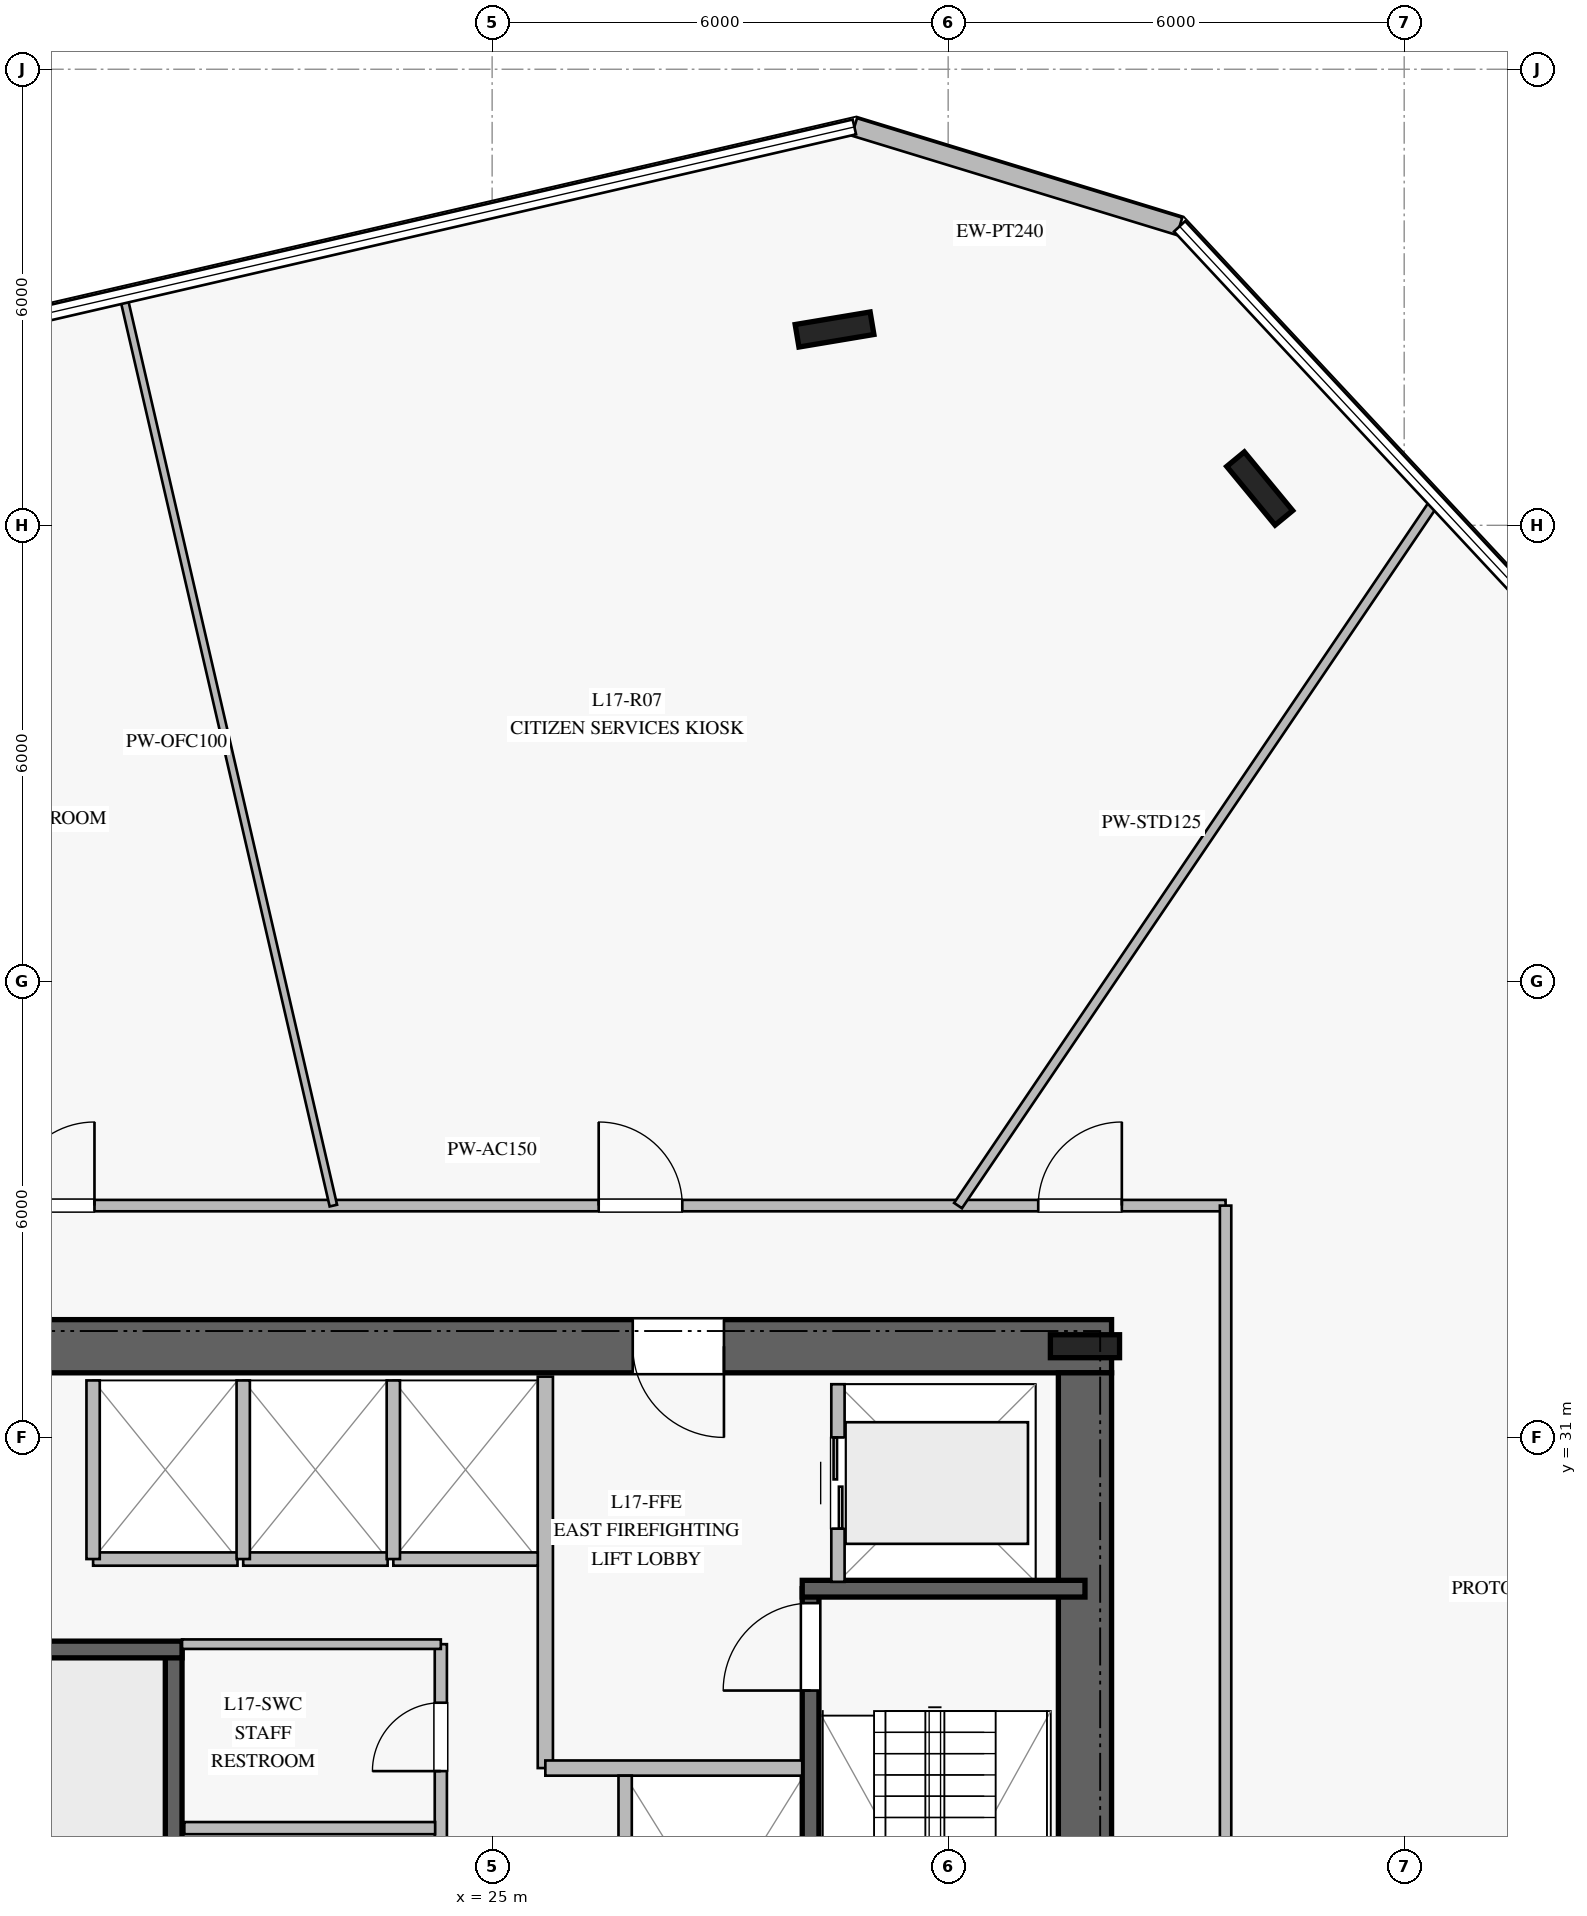
"""IFC4 building model, lengths in metres.
Left out: names, types, materials, properties, quantities, classifications, styles, units other than length and angle.
Written with IfcOpenShell. Run it as: python <this file> out.ifc"""

import sys

from ifc_helpers import new_model, si_unit, direction, frame, frame_2d, origin, origin_2d, place, context, subcontext, project, spatial, rectangle, i_section, extrude, element, fill, save


model = new_model("IFC4")
c1 = context("Model", 3, precision=1e-05, world=origin(), true_north=direction((0.0, 1.0)))
c2 = subcontext(c1, "Body", "Model", "MODEL_VIEW")
j1 = project(units=[si_unit("LENGTHUNIT", "METRE"), si_unit("PLANEANGLEUNIT", "RADIAN")], contexts=[c1])
p1 = place(None, origin())
s1 = spatial("IfcSite", under=j1, at=p1, CompositionType="ELEMENT")
p2 = place(p1, origin())
s2 = spatial("IfcBuilding", under=s1, at=p2, CompositionType="ELEMENT")
p3 = place(p2, frame((0.0, 0.0, 72.0)))
s3 = spatial("IfcBuildingStorey", under=s2, at=p3, CompositionType="ELEMENT", Elevation=72.0)
p4 = place(p3, frame((33.15, 32.2, 0.0), z_axis=(0.0, 0.0, 1.0), x_axis=(-1.0, 0.0, 0.0)))
e1 = element("IfcWall", 1, at=p4, inside=s3, PredefinedType="SHEAR", context=c2, shape_type="SweptSolid", body=[
    extrude(rectangle(XDim=16.3, YDim=0.7, at=frame_2d((8.15, 0.0))), origin(), (0.0, 0.0, 1.0), 3.76),
])
p5 = place(p4, frame((5.1, 0.0, 0.0)))
e2 = element("IfcOpeningElement", 2, at=p5, cuts=e1, PredefinedType="OPENING", context=c2, shape_type="SweptSolid", body=[
    extrude(rectangle(XDim=1.2, YDim=2.25, at=frame_2d((0.6, 1.125))), frame((0.0, 0.36, 0.0), z_axis=(0.0, -1.0, 0.0), x_axis=(1.0, 0.0, 0.0)), (0.0, 0.0, 1.0), 0.72),
])
p6 = place(p3, frame((32.8, 18.15, 0.0), z_axis=(0.0, 0.0, 1.0), x_axis=(0.0, 1.0, 0.0)))
e3 = element("IfcWall", 3, at=p6, inside=s3, PredefinedType="SHEAR", context=c2, shape_type="SweptSolid", body=[
    extrude(rectangle(XDim=13.7, YDim=0.7, at=frame_2d((6.85, 0.0))), origin(), (0.0, 0.0, 1.0), 3.76),
])
p7 = place(p3, frame((32.8, 32.2, 0.0), z_axis=(0.0, 0.0, 1.0), x_axis=(1.0, 0.0, 0.0)))
e4 = element("IfcColumn", 4, at=p7, inside=s3, PredefinedType="COLUMN", context=c2, shape_type="SweptSolid", body=[
    extrude(i_section(OverallWidth=0.302, OverallDepth=0.91, WebThickness=0.021, FlangeThickness=0.04, at=origin_2d()), origin(), (0.0, 0.0, 1.0), 4.0),
])
p8 = place(p3, frame((20.81, 20.99, 0.0), z_axis=(0.0, 0.0, 1.0), x_axis=(0.0, 1.0, 0.0)))
e5 = element("IfcWall", 5, at=p8, inside=s3, PredefinedType="SOLIDWALL", context=c2, shape_type="SweptSolid", body=[
    extrude(rectangle(XDim=7.22, YDim=0.22, at=frame_2d((3.61, 0.0))), origin(), (0.0, 0.0, 1.0), 3.76),
])
p9 = place(p8, frame((0.18, 0.0, 0.0)))
e6 = element("IfcOpeningElement", 6, at=p9, cuts=e5, PredefinedType="OPENING", context=c2, shape_type="SweptSolid", body=[
    extrude(rectangle(XDim=1.15, YDim=2.2, at=frame_2d((0.575, 1.1))), frame((0.0, 0.12, 0.0), z_axis=(0.0, -1.0, 0.0), x_axis=(1.0, 0.0, 0.0)), (0.0, 0.0, 1.0), 0.24),
])
p10 = place(p3, frame((17.2, 28.21, 0.0), z_axis=(0.0, 0.0, 1.0), x_axis=(1.0, 0.0, 0.0)))
e7 = element("IfcWall", 7, at=p10, inside=s3, PredefinedType="SOLIDWALL", context=c2, shape_type="SweptSolid", body=[
    extrude(rectangle(XDim=3.72, YDim=0.22, at=frame_2d((1.86, 0.0))), origin(), (0.0, 0.0, 1.0), 3.76),
])
p11 = place(p3, frame((29.19, 21.79, 0.0), z_axis=(0.0, 0.0, 1.0), x_axis=(0.0, 1.0, 0.0)))
e8 = element("IfcWall", 8, at=p11, inside=s3, PredefinedType="SOLIDWALL", context=c2, shape_type="SweptSolid", body=[
    extrude(rectangle(XDim=7.22, YDim=0.22, at=frame_2d((3.61, 0.0))), origin(), (0.0, 0.0, 1.0), 3.76),
])
p12 = place(p11, frame((5.88, 0.0, 0.0)))
e9 = element("IfcOpeningElement", 9, at=p12, cuts=e8, PredefinedType="OPENING", context=c2, shape_type="SweptSolid", body=[
    extrude(rectangle(XDim=1.15, YDim=2.2, at=frame_2d((0.575, 1.1))), frame((0.0, 0.12, 0.0), z_axis=(0.0, -1.0, 0.0), x_axis=(1.0, 0.0, 0.0)), (0.0, 0.0, 1.0), 0.24),
])
p13 = place(p3, frame((29.08, 29.01, 0.0), z_axis=(0.0, 0.0, 1.0), x_axis=(1.0, 0.0, 0.0)))
e10 = element("IfcWall", 10, at=p13, inside=s3, PredefinedType="SOLIDWALL", context=c2, shape_type="SweptSolid", body=[
    extrude(rectangle(XDim=3.72, YDim=0.22, at=frame_2d((1.86, 0.0))), origin(), (0.0, 0.0, 1.0), 3.76),
])
for number, where, z_axis, x_axis in (
    (11, (35.099, 43.484, 0.0), (0.0, 0.0, 1.0), (-0.636, 0.772, 0.0)),
    (12, (29.505, 45.576, 0.0), (0.0, 0.0, 1.0), (0.986, 0.165, 0.0)),
):
    element("IfcColumn", number, at=place(p3, frame(where, z_axis=z_axis, x_axis=x_axis)), inside=s3, PredefinedType="COLUMN", context=c2, shape_type="SweptSolid", body=[
        extrude(i_section(OverallWidth=0.3, OverallDepth=1.0, WebThickness=0.019, FlangeThickness=0.036, at=origin_2d()), origin(), (0.0, 0.0, 1.0), 4.0),
    ])
p14 = place(p3, frame((34.045, 46.933, 0.0), z_axis=(0.0, 0.0, 1.0), x_axis=(-0.956323609786, 0.292310029535, 0.0)))
e13 = element("IfcWall", 13, at=p14, inside=s3, PredefinedType="STANDARD", context=c2, shape_type="SweptSolid", body=[
    extrude(rectangle(XDim=4.474, YDim=0.24, at=frame_2d((2.237, 0.0))), origin(), (0.0, 0.0, 1.0), 3.76),
])
p15 = place(p3, frame((25.7, 26.65, 0.0), z_axis=(0.0, 0.0, 1.0), x_axis=(0.0, 1.0, 0.0)))
e14 = element("IfcWall", 14, at=p15, inside=s3, PredefinedType="PARTITIONING", context=c2, shape_type="SweptSolid", body=[
    extrude(rectangle(XDim=5.15, YDim=0.2, at=frame_2d((2.575, 0.0))), origin(), (0.0, 0.0, 1.0), 3.76),
])
p16 = place(p3, frame((25.7, 26.65, 0.0), z_axis=(0.0, 0.0, 1.0), x_axis=(1.0, 0.0, 0.0)))
e15 = element("IfcWall", 15, at=p16, inside=s3, PredefinedType="PARTITIONING", context=c2, shape_type="SweptSolid", body=[
    extrude(rectangle(XDim=3.38, YDim=0.2, at=frame_2d((1.69, 0.0))), origin(), (0.0, 0.0, 1.0), 3.76),
])
p17 = place(p3, frame((24.325, 23.35, 0.0), z_axis=(0.0, 0.0, 1.0), x_axis=(0.0, 1.0, 0.0)))
e16 = element("IfcWall", 16, at=p17, inside=s3, PredefinedType="PLUMBINGWALL", context=c2, shape_type="SweptSolid", body=[
    extrude(rectangle(XDim=4.93, YDim=0.16, at=frame_2d((2.465, 0.0))), origin(), (0.0, 0.0, 1.0), 3.76),
])
p18 = place(p17, frame((0.8, 0.0, 0.0)))
e17 = element("IfcOpeningElement", 17, at=p18, cuts=e16, PredefinedType="OPENING", context=c2, shape_type="SweptSolid", body=[
    extrude(rectangle(XDim=0.95, YDim=2.1, at=frame_2d((0.475, 1.05))), frame((0.0, 0.09, 0.0), z_axis=(0.0, -1.0, 0.0), x_axis=(1.0, 0.0, 0.0)), (0.0, 0.0, 1.0), 0.18),
])
p19 = place(p17, frame((3.26, 0.0, 0.0)))
e18 = element("IfcOpeningElement", 18, at=p19, cuts=e16, PredefinedType="OPENING", context=c2, shape_type="SweptSolid", body=[
    extrude(rectangle(XDim=0.9, YDim=2.1, at=frame_2d((0.45, 1.05))), frame((0.0, 0.09, 0.0), z_axis=(0.0, -1.0, 0.0), x_axis=(1.0, 0.0, 0.0)), (0.0, 0.0, 1.0), 0.18),
])
p20 = place(p3, frame((20.92, 28.28, 0.0), z_axis=(0.0, 0.0, 1.0), x_axis=(1.0, 0.0, 0.0)))
e19 = element("IfcWall", 19, at=p20, inside=s3, PredefinedType="PARTITIONING", context=c2, shape_type="SweptSolid", body=[
    extrude(rectangle(XDim=3.405, YDim=0.125, at=frame_2d((1.703, 0.0))), origin(), (0.0, 0.0, 1.0), 3.76),
])
p21 = place(p3, frame((20.95, 25.86, 0.0), z_axis=(0.0, 0.0, 1.0), x_axis=(1.0, 0.0, 0.0)))
e20 = element("IfcWall", 20, at=p21, inside=s3, PredefinedType="PLUMBINGWALL", context=c2, shape_type="SweptSolid", body=[
    extrude(rectangle(XDim=3.3, YDim=0.16, at=frame_2d((1.65, 0.0))), origin(), (0.0, 0.0, 1.0), 3.76),
])
p22 = place(p3, frame((19.75, 29.4, 0.0), z_axis=(0.0, 0.0, 1.0), x_axis=(1.0, 0.0, 0.0)))
e21 = element("IfcWall", 21, at=p22, inside=s3, PredefinedType="PARTITIONING", context=c2, shape_type="SweptSolid", body=[
    extrude(rectangle(XDim=1.9, YDim=0.175, at=frame_2d((0.95, 0.0))), origin(), (0.0, 0.0, 1.0), 3.76),
])
p23 = place(p3, frame((19.75, 29.4, 0.0), z_axis=(0.0, 0.0, 1.0), x_axis=(0.0, 1.0, 0.0)))
e22 = element("IfcWall", 22, at=p23, inside=s3, PredefinedType="PARTITIONING", context=c2, shape_type="SweptSolid", body=[
    extrude(rectangle(XDim=2.35, YDim=0.175, at=frame_2d((1.175, 0.0))), origin(), (0.0, 0.0, 1.0), 3.76),
])
p24 = place(p3, frame((21.725, 29.4, 0.0), z_axis=(0.0, 0.0, 1.0), x_axis=(1.0, 0.0, 0.0)))
e23 = element("IfcWall", 23, at=p24, inside=s3, PredefinedType="PARTITIONING", context=c2, shape_type="SweptSolid", body=[
    extrude(rectangle(XDim=1.9, YDim=0.175, at=frame_2d((0.95, 0.0))), origin(), (0.0, 0.0, 1.0), 3.76),
])
p25 = place(p3, frame((21.725, 29.4, 0.0), z_axis=(0.0, 0.0, 1.0), x_axis=(0.0, 1.0, 0.0)))
e24 = element("IfcWall", 24, at=p25, inside=s3, PredefinedType="PARTITIONING", context=c2, shape_type="SweptSolid", body=[
    extrude(rectangle(XDim=2.35, YDim=0.175, at=frame_2d((1.175, 0.0))), origin(), (0.0, 0.0, 1.0), 3.76),
])
p26 = place(p3, frame((23.7, 29.4, 0.0), z_axis=(0.0, 0.0, 1.0), x_axis=(1.0, 0.0, 0.0)))
e25 = element("IfcWall", 25, at=p26, inside=s3, PredefinedType="PARTITIONING", context=c2, shape_type="SweptSolid", body=[
    extrude(rectangle(XDim=1.9, YDim=0.175, at=frame_2d((0.95, 0.0))), origin(), (0.0, 0.0, 1.0), 3.76),
])
p27 = place(p3, frame((23.7, 29.4, 0.0), z_axis=(0.0, 0.0, 1.0), x_axis=(0.0, 1.0, 0.0)))
e26 = element("IfcWall", 26, at=p27, inside=s3, PredefinedType="PARTITIONING", context=c2, shape_type="SweptSolid", body=[
    extrude(rectangle(XDim=2.35, YDim=0.175, at=frame_2d((1.175, 0.0))), origin(), (0.0, 0.0, 1.0), 3.76),
])
p28 = place(p3, frame((26.75, 24.65, 0.0), z_axis=(0.0, 0.0, 1.0), x_axis=(0.0, 1.0, 0.0)))
e27 = element("IfcWall", 27, at=p28, inside=s3, PredefinedType="PARTITIONING", context=c2, shape_type="SweptSolid", body=[
    extrude(rectangle(XDim=1.9, YDim=0.175, at=frame_2d((0.95, 0.0))), origin(), (0.0, 0.0, 1.0), 3.76),
])
p29 = place(p3, frame((29.55, 29.1, 0.0), z_axis=(0.0, 0.0, 1.0), x_axis=(0.0, 1.0, 0.0)))
e28 = element("IfcWall", 28, at=p29, inside=s3, PredefinedType="PARTITIONING", context=c2, shape_type="SweptSolid", body=[
    extrude(rectangle(XDim=2.6, YDim=0.175, at=frame_2d((1.3, 0.0))), origin(), (0.0, 0.0, 1.0), 3.76),
])
p30 = place(p29, frame((0.7, 0.0, 0.0)))
e29 = element("IfcOpeningElement", 29, at=p30, cuts=e28, PredefinedType="OPENING", context=c2, shape_type="SweptSolid", body=[
    extrude(rectangle(XDim=1.2, YDim=2.2, at=frame_2d((0.6, 1.1))), frame((0.0, 0.098, 0.0), z_axis=(0.0, -1.0, 0.0), x_axis=(1.0, 0.0, 0.0)), (0.0, 0.0, 1.0), 0.195),
])
p31 = place(p3, frame((15.35, 34.05, 0.0), z_axis=(0.0, 0.0, 1.0), x_axis=(1.0, 0.0, 0.0)))
e30 = element("IfcWall", 30, at=p31, inside=s3, PredefinedType="PARTITIONING", context=c2, shape_type="SweptSolid", body=[
    extrude(rectangle(XDim=19.3, YDim=0.15, at=frame_2d((9.65, 0.0))), origin(), (0.0, 0.0, 1.0), 3.21),
])
p32 = place(p31, frame((16.835, 0.0, 0.0)))
e31 = element("IfcOpeningElement", 31, at=p32, cuts=e30, PredefinedType="OPENING", context=c2, shape_type="SweptSolid", body=[
    extrude(rectangle(XDim=1.1, YDim=2.2, at=frame_2d((0.55, 1.1))), frame((0.0, 0.085, 0.0), z_axis=(0.0, -1.0, 0.0), x_axis=(1.0, 0.0, 0.0)), (0.0, 0.0, 1.0), 0.17),
])
p33 = place(p31, frame((11.052, 0.0, 0.0)))
e32 = element("IfcOpeningElement", 32, at=p33, cuts=e30, PredefinedType="OPENING", context=c2, shape_type="SweptSolid", body=[
    extrude(rectangle(XDim=1.1, YDim=2.2, at=frame_2d((0.55, 1.1))), frame((0.0, 0.085, 0.0), z_axis=(0.0, -1.0, 0.0), x_axis=(1.0, 0.0, 0.0)), (0.0, 0.0, 1.0), 0.17),
])
p34 = place(p31, frame((3.318, 0.0, 0.0)))
e33 = element("IfcOpeningElement", 33, at=p34, cuts=e30, PredefinedType="OPENING", context=c2, shape_type="SweptSolid", body=[
    extrude(rectangle(XDim=1.1, YDim=2.2, at=frame_2d((0.55, 1.1))), frame((0.0, 0.085, 0.0), z_axis=(0.0, -1.0, 0.0), x_axis=(1.0, 0.0, 0.0)), (0.0, 0.0, 1.0), 0.17),
])
p35 = place(p3, frame((34.65, 34.05, 0.0), z_axis=(0.0, 0.0, 1.0), x_axis=(0.0, -1.0, 0.0)))
e34 = element("IfcWall", 34, at=p35, inside=s3, PredefinedType="PARTITIONING", context=c2, shape_type="SweptSolid", body=[
    extrude(rectangle(XDim=18.1, YDim=0.15, at=frame_2d((9.05, 0.0))), origin(), (0.0, 0.0, 1.0), 3.21),
])
p36 = place(p35, frame((13.102, 0.0, 0.0)))
e35 = element("IfcOpeningElement", 35, at=p36, cuts=e34, PredefinedType="OPENING", context=c2, shape_type="SweptSolid", body=[
    extrude(rectangle(XDim=1.1, YDim=2.2, at=frame_2d((0.55, 1.1))), frame((0.0, 0.085, 0.0), z_axis=(0.0, -1.0, 0.0), x_axis=(1.0, 0.0, 0.0)), (0.0, 0.0, 1.0), 0.17),
])
p37 = place(p3, frame((31.13, 34.05, 0.0), z_axis=(0.0, 0.0, 1.0), x_axis=(0.560811937369, 0.827943217198, 0.0)))
e36 = element("IfcWall", 36, at=p37, inside=s3, PredefinedType="PARTITIONING", context=c2, shape_type="SweptSolid", body=[
    extrude(rectangle(XDim=11.182, YDim=0.125, at=frame_2d((5.591, 0.0))), origin(), (0.0, 0.0, 1.0), 3.02),
])
p38 = place(p3, frame((22.911, 34.05, 0.0), z_axis=(0.0, 0.0, 1.0), x_axis=(-0.224987411573, 0.974361670343, 0.0)))
e37 = element("IfcWall", 37, at=p38, inside=s3, PredefinedType="MOVABLE", context=c2, shape_type="SweptSolid", body=[
    extrude(rectangle(XDim=12.267, YDim=0.1, at=frame_2d((6.134, 0.0))), origin(), (0.0, 0.0, 1.0), 3.06),
])
p39 = place(p12, origin())
e38 = element("IfcDoor", 38, at=p39, inside=s3, OperationType="SINGLE_SWING_LEFT", PredefinedType="DOOR", context=c2, shape_type="SweptSolid", body=[
    extrude(rectangle(XDim=1.15, YDim=2.2, at=frame_2d((0.575, 1.1))), frame((0.0, 0.025, 0.0), z_axis=(0.0, -1.0, 0.0), x_axis=(1.0, 0.0, 0.0)), (0.0, 0.0, 1.0), 0.05),
])
fill(e9, e38)
p40 = place(p5, origin())
e39 = element("IfcDoor", 39, at=p40, inside=s3, OperationType="SINGLE_SWING_LEFT", PredefinedType="DOOR", context=c2, shape_type="SweptSolid", body=[
    extrude(rectangle(XDim=1.2, YDim=2.25, at=frame_2d((0.6, 1.125))), frame((0.0, 0.025, 0.0), z_axis=(0.0, -1.0, 0.0), x_axis=(1.0, 0.0, 0.0)), (0.0, 0.0, 1.0), 0.05),
])
fill(e2, e39)
p41 = place(p19, origin())
e40 = element("IfcDoor", 40, at=p41, inside=s3, OperationType="SINGLE_SWING_LEFT", PredefinedType="DOOR", context=c2, shape_type="SweptSolid", body=[
    extrude(rectangle(XDim=0.9, YDim=2.1, at=frame_2d((0.45, 1.05))), frame((0.0, 0.025, 0.0), z_axis=(0.0, -1.0, 0.0), x_axis=(1.0, 0.0, 0.0)), (0.0, 0.0, 1.0), 0.05),
])
fill(e18, e40)
p42 = place(p30, origin())
e41 = element("IfcDoor", 41, at=p42, inside=s3, OperationType="DOUBLE_DOOR_SLIDING", PredefinedType="DOOR", context=c2, shape_type="SweptSolid", body=[
    extrude(rectangle(XDim=1.2, YDim=2.2, at=frame_2d((0.6, 1.1))), frame((0.0, 0.025, 0.0), z_axis=(0.0, -1.0, 0.0), x_axis=(1.0, 0.0, 0.0)), (0.0, 0.0, 1.0), 0.05),
])
fill(e29, e41)
p43 = place(p32, origin())
e42 = element("IfcDoor", 42, at=p43, inside=s3, OperationType="SINGLE_SWING_RIGHT", PredefinedType="DOOR", context=c2, shape_type="SweptSolid", body=[
    extrude(rectangle(XDim=1.1, YDim=2.2, at=frame_2d((0.55, 1.1))), frame((0.0, 0.025, 0.0), z_axis=(0.0, -1.0, 0.0), x_axis=(1.0, 0.0, 0.0)), (0.0, 0.0, 1.0), 0.05),
])
fill(e31, e42)
p44 = place(p33, origin())
e43 = element("IfcDoor", 43, at=p44, inside=s3, OperationType="SINGLE_SWING_LEFT", PredefinedType="DOOR", context=c2, shape_type="SweptSolid", body=[
    extrude(rectangle(XDim=1.1, YDim=2.2, at=frame_2d((0.55, 1.1))), frame((0.0, 0.025, 0.0), z_axis=(0.0, -1.0, 0.0), x_axis=(1.0, 0.0, 0.0)), (0.0, 0.0, 1.0), 0.05),
])
fill(e32, e43)
p45 = place(p34, origin())
e44 = element("IfcDoor", 44, at=p45, inside=s3, OperationType="SINGLE_SWING_RIGHT", PredefinedType="DOOR", context=c2, shape_type="SweptSolid", body=[
    extrude(rectangle(XDim=1.1, YDim=2.2, at=frame_2d((0.55, 1.1))), frame((0.0, 0.025, 0.0), z_axis=(0.0, -1.0, 0.0), x_axis=(1.0, 0.0, 0.0)), (0.0, 0.0, 1.0), 0.05),
])
fill(e33, e44)
save(model, sys.argv[1])
